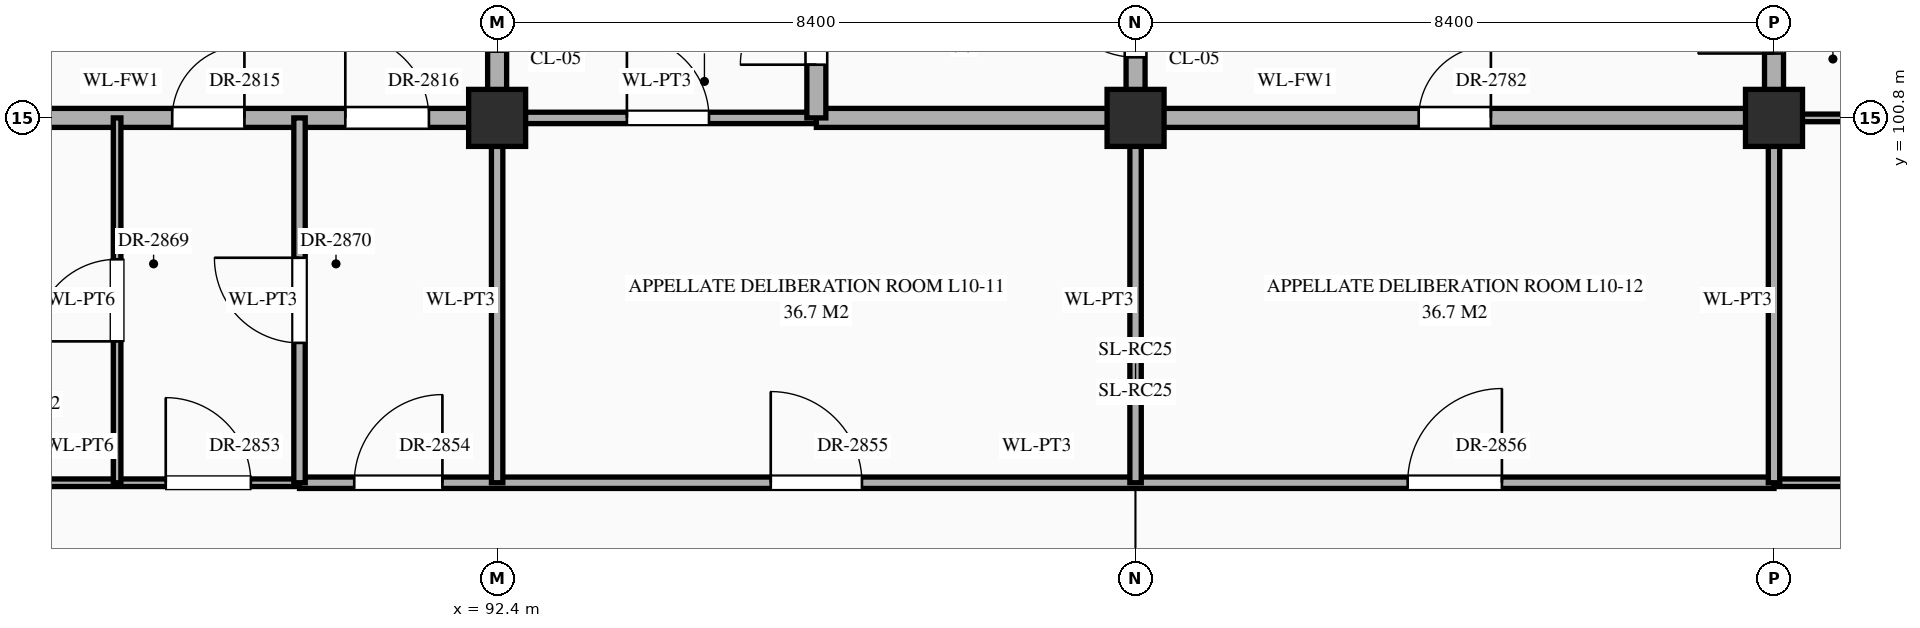
"""IFC4 building model, lengths in metres.
Left out: names, types, materials, properties, quantities, classifications, styles, units other than length and angle.
Written with IfcOpenShell. Run it as: python <this file> out.ifc"""

import sys

from ifc_helpers import new_model, si_unit, direction, frame, frame_2d, origin, origin_2d, place, context, subcontext, project, spatial, rectangle, extrude, element, fill, save


model = new_model("IFC4")
c1 = context("Model", 3, precision=1e-05, world=origin(), true_north=direction((0.0, 1.0)))
c2 = subcontext(c1, "Body", "Model", "MODEL_VIEW")
j1 = project(units=[si_unit("LENGTHUNIT", "METRE"), si_unit("PLANEANGLEUNIT", "RADIAN")], contexts=[c1])
p1 = place(None, origin())
s1 = spatial("IfcSite", under=j1, at=p1, CompositionType="ELEMENT")
p2 = place(p1, origin())
s2 = spatial("IfcBuilding", under=s1, at=p2, CompositionType="ELEMENT")
p3 = place(p2, frame((0.0, 0.0, 43.5)))
s3 = spatial("IfcBuildingStorey", under=s2, at=p3, CompositionType="ELEMENT", Elevation=43.5)
for number, where, z_axis, x_axis in (
    (1, (92.4, 100.8, 0.0), (0.0, 0.0, 1.0), (1.0, 0.0, 0.0)),
    (2, (100.8, 100.8, 0.0), (0.0, 0.0, 1.0), (1.0, 0.0, 0.0)),
    (3, (109.2, 100.8, 0.0), (0.0, 0.0, 1.0), (1.0, 0.0, 0.0)),
):
    element("IfcColumn", number, at=place(p3, frame(where, z_axis=z_axis, x_axis=x_axis)), inside=s3, PredefinedType="COLUMN", context=c2, shape_type="SweptSolid", body=[
        extrude(rectangle(XDim=0.75, YDim=0.75, at=origin_2d()), origin(), (0.0, 0.0, 1.0), 4.2),
    ])
p4 = place(p3, frame((84.0, 96.0, 0.0), z_axis=(0.0, 0.0, 1.0), x_axis=(1.0, 0.0, 0.0)))
e4 = element("IfcWall", 4, at=p4, inside=s3, PredefinedType="STANDARD", context=c2, shape_type="SweptSolid", body=[
    extrude(rectangle(XDim=5.8, YDim=0.1, at=frame_2d((2.9, 0.0))), origin(), (0.0, 0.0, 1.0), 3.95),
])
p5 = place(p4, frame((1.16, 0.0, 0.0)))
e5 = element("IfcOpeningElement", 5, at=p5, cuts=e4, PredefinedType="OPENING", context=c2, shape_type="SweptSolid", body=[
    extrude(rectangle(XDim=1.08, YDim=2.25, at=frame_2d((0.54, 1.125))), frame((0.0, 0.062, 0.0), z_axis=(0.0, -1.0, 0.0), x_axis=(1.0, 0.0, 0.0)), (0.0, 0.0, 1.0), 0.124),
])
p6 = place(p4, frame((4.04, 0.0, 0.0)))
e6 = element("IfcOpeningElement", 6, at=p6, cuts=e4, PredefinedType="OPENING", context=c2, shape_type="SweptSolid", body=[
    extrude(rectangle(XDim=1.12, YDim=2.25, at=frame_2d((0.56, 1.125))), frame((0.0, 0.062, 0.0), z_axis=(0.0, -1.0, 0.0), x_axis=(1.0, 0.0, 0.0)), (0.0, 0.0, 1.0), 0.124),
])
p7 = place(p3, frame((89.8, 96.0, 0.0), z_axis=(0.0, 0.0, 1.0), x_axis=(1.0, 0.0, 0.0)))
e7 = element("IfcWall", 7, at=p7, inside=s3, PredefinedType="STANDARD", context=c2, shape_type="SweptSolid", body=[
    extrude(rectangle(XDim=19.4, YDim=0.15, at=frame_2d((9.7, 0.0))), origin(), (0.0, 0.0, 1.0), 3.95),
])
p8 = place(p7, frame((0.72, 0.0, 0.0)))
e8 = element("IfcOpeningElement", 8, at=p8, cuts=e7, PredefinedType="OPENING", context=c2, shape_type="SweptSolid", body=[
    extrude(rectangle(XDim=1.16, YDim=2.3, at=frame_2d((0.58, 1.15))), frame((0.0, 0.087, 0.0), z_axis=(0.0, -1.0, 0.0), x_axis=(1.0, 0.0, 0.0)), (0.0, 0.0, 1.0), 0.174),
])
p9 = place(p7, frame((6.2, 0.0, 0.0)))
e9 = element("IfcOpeningElement", 9, at=p9, cuts=e7, PredefinedType="OPENING", context=c2, shape_type="SweptSolid", body=[
    extrude(rectangle(XDim=1.2, YDim=2.35, at=frame_2d((0.6, 1.175))), frame((0.0, 0.087, 0.0), z_axis=(0.0, -1.0, 0.0), x_axis=(1.0, 0.0, 0.0)), (0.0, 0.0, 1.0), 0.174),
])
p10 = place(p7, frame((14.58, 0.0, 0.0)))
e10 = element("IfcOpeningElement", 10, at=p10, cuts=e7, PredefinedType="OPENING", context=c2, shape_type="SweptSolid", body=[
    extrude(rectangle(XDim=1.24, YDim=2.3, at=frame_2d((0.62, 1.15))), frame((0.0, 0.087, 0.0), z_axis=(0.0, -1.0, 0.0), x_axis=(1.0, 0.0, 0.0)), (0.0, 0.0, 1.0), 0.174),
])
p11 = place(p3, frame((109.2, 96.0, 0.0), z_axis=(0.0, 0.0, 1.0), x_axis=(1.0, 0.0, 0.0)))
e11 = element("IfcWall", 11, at=p11, inside=s3, PredefinedType="STANDARD", context=c2, shape_type="SweptSolid", body=[
    extrude(rectangle(XDim=5.8, YDim=0.1, at=frame_2d((2.9, 0.0))), origin(), (0.0, 0.0, 1.0), 3.95),
])
p12 = place(p11, frame((1.06, 0.0, 0.0)))
e12 = element("IfcOpeningElement", 12, at=p12, cuts=e11, PredefinedType="OPENING", context=c2, shape_type="SweptSolid", body=[
    extrude(rectangle(XDim=1.28, YDim=2.35, at=frame_2d((0.64, 1.175))), frame((0.0, 0.062, 0.0), z_axis=(0.0, -1.0, 0.0), x_axis=(1.0, 0.0, 0.0)), (0.0, 0.0, 1.0), 0.124),
])
p13 = place(p11, frame((4.13, 0.0, 0.0)))
e13 = element("IfcOpeningElement", 13, at=p13, cuts=e11, PredefinedType="OPENING", context=c2, shape_type="SweptSolid", body=[
    extrude(rectangle(XDim=0.94, YDim=2.3, at=frame_2d((0.47, 1.15))), frame((0.0, 0.062, 0.0), z_axis=(0.0, -1.0, 0.0), x_axis=(1.0, 0.0, 0.0)), (0.0, 0.0, 1.0), 0.124),
])
p14 = place(p3, frame((75.6, 100.8, 0.0), z_axis=(0.0, 0.0, 1.0), x_axis=(1.0, 0.0, 0.0)))
e14 = element("IfcWall", 14, at=p14, inside=s3, PredefinedType="STANDARD", context=c2, shape_type="SweptSolid", body=[
    extrude(rectangle(XDim=16.8, YDim=0.25, at=frame_2d((8.4, 0.0))), origin(), (0.0, 0.0, 1.0), 3.1),
])
p15 = place(p14, frame((3.725, 0.0, 0.0)))
e15 = element("IfcOpeningElement", 15, at=p15, cuts=e14, PredefinedType="OPENING", context=c2, shape_type="SweptSolid", body=[
    extrude(rectangle(XDim=0.95, YDim=2.15, at=frame_2d((0.475, 1.075))), frame((0.0, 0.137, 0.0), z_axis=(0.0, -1.0, 0.0), x_axis=(1.0, 0.0, 0.0)), (0.0, 0.0, 1.0), 0.274),
])
p16 = place(p14, frame((9.748, 0.0, 0.0)))
e16 = element("IfcOpeningElement", 16, at=p16, cuts=e14, PredefinedType="OPENING", context=c2, shape_type="SweptSolid", body=[
    extrude(rectangle(XDim=1.0, YDim=2.2, at=frame_2d((0.5, 1.1))), frame((0.0, 0.137, 0.0), z_axis=(0.0, -1.0, 0.0), x_axis=(1.0, 0.0, 0.0)), (0.0, 0.0, 1.0), 0.274),
])
p17 = place(p14, frame((12.525, 0.0, 0.0)))
e17 = element("IfcOpeningElement", 17, at=p17, cuts=e14, PredefinedType="OPENING", context=c2, shape_type="SweptSolid", body=[
    extrude(rectangle(XDim=0.95, YDim=2.15, at=frame_2d((0.475, 1.075))), frame((0.0, 0.137, 0.0), z_axis=(0.0, -1.0, 0.0), x_axis=(1.0, 0.0, 0.0)), (0.0, 0.0, 1.0), 0.274),
])
p18 = place(p14, frame((14.802, 0.0, 0.0)))
e18 = element("IfcOpeningElement", 18, at=p18, cuts=e14, PredefinedType="OPENING", context=c2, shape_type="SweptSolid", body=[
    extrude(rectangle(XDim=1.1, YDim=2.2, at=frame_2d((0.55, 1.1))), frame((0.0, 0.137, 0.0), z_axis=(0.0, -1.0, 0.0), x_axis=(1.0, 0.0, 0.0)), (0.0, 0.0, 1.0), 0.274),
])
p19 = place(p3, frame((92.4, 100.8, 0.0), z_axis=(0.0, 0.0, 1.0), x_axis=(1.0, 0.0, 0.0)))
e19 = element("IfcWall", 19, at=p19, inside=s3, PredefinedType="STANDARD", context=c2, shape_type="SweptSolid", body=[
    extrude(rectangle(XDim=4.2, YDim=0.15, at=frame_2d((2.1, 0.0))), origin(), (0.0, 0.0, 1.0), 3.1),
])
p20 = place(p19, frame((1.708, 0.0, 0.0)))
e20 = element("IfcOpeningElement", 20, at=p20, cuts=e19, PredefinedType="OPENING", context=c2, shape_type="SweptSolid", body=[
    extrude(rectangle(XDim=1.08, YDim=2.25, at=frame_2d((0.54, 1.125))), frame((0.0, 0.087, 0.0), z_axis=(0.0, -1.0, 0.0), x_axis=(1.0, 0.0, 0.0)), (0.0, 0.0, 1.0), 0.174),
])
p21 = place(p3, frame((96.6, 100.8, 0.0), z_axis=(0.0, 0.0, 1.0), x_axis=(1.0, 0.0, 0.0)))
e21 = element("IfcWall", 21, at=p21, inside=s3, PredefinedType="STANDARD", context=c2, shape_type="SweptSolid", body=[
    extrude(rectangle(XDim=12.6, YDim=0.25, at=frame_2d((6.3, 0.0))), origin(), (0.0, 0.0, 1.0), 3.1),
])
p22 = place(p21, frame((7.925, 0.0, 0.0)))
e22 = element("IfcOpeningElement", 22, at=p22, cuts=e21, PredefinedType="OPENING", context=c2, shape_type="SweptSolid", body=[
    extrude(rectangle(XDim=0.95, YDim=2.15, at=frame_2d((0.475, 1.075))), frame((0.0, 0.137, 0.0), z_axis=(0.0, -1.0, 0.0), x_axis=(1.0, 0.0, 0.0)), (0.0, 0.0, 1.0), 0.274),
])
p23 = place(p3, frame((109.2, 100.8, 0.0), z_axis=(0.0, 0.0, 1.0), x_axis=(1.0, 0.0, 0.0)))
e23 = element("IfcWall", 23, at=p23, inside=s3, PredefinedType="STANDARD", context=c2, shape_type="SweptSolid", body=[
    extrude(rectangle(XDim=3.4, YDim=0.1, at=frame_2d((1.7, 0.0))), origin(), (0.0, 0.0, 1.0), 3.1),
])
p24 = place(p23, frame((1.417, 0.0, 0.0)))
e24 = element("IfcOpeningElement", 24, at=p24, cuts=e23, PredefinedType="OPENING", context=c2, shape_type="SweptSolid", body=[
    extrude(rectangle(XDim=0.86, YDim=2.1, at=frame_2d((0.43, 1.05))), frame((0.0, 0.062, 0.0), z_axis=(0.0, -1.0, 0.0), x_axis=(1.0, 0.0, 0.0)), (0.0, 0.0, 1.0), 0.124),
])
p25 = place(p3, frame((87.4, 96.0, 0.0), z_axis=(0.0, 0.0, 1.0), x_axis=(0.0, 1.0, 0.0)))
e25 = element("IfcWall", 25, at=p25, inside=s3, PredefinedType="STANDARD", context=c2, shape_type="SweptSolid", body=[
    extrude(rectangle(XDim=4.8, YDim=0.1, at=frame_2d((2.4, 0.0))), origin(), (0.0, 0.0, 1.0), 3.95),
])
p26 = place(p25, frame((1.86, 0.0, 0.0)))
e26 = element("IfcOpeningElement", 26, at=p26, cuts=e25, PredefinedType="OPENING", context=c2, shape_type="SweptSolid", body=[
    extrude(rectangle(XDim=1.08, YDim=2.25, at=frame_2d((0.54, 1.125))), frame((0.0, 0.062, 0.0), z_axis=(0.0, -1.0, 0.0), x_axis=(1.0, 0.0, 0.0)), (0.0, 0.0, 1.0), 0.124),
])
p27 = place(p3, frame((89.8, 96.0, 0.0), z_axis=(0.0, 0.0, 1.0), x_axis=(0.0, 1.0, 0.0)))
e27 = element("IfcWall", 27, at=p27, inside=s3, PredefinedType="STANDARD", context=c2, shape_type="SweptSolid", body=[
    extrude(rectangle(XDim=4.8, YDim=0.15, at=frame_2d((2.4, 0.0))), origin(), (0.0, 0.0, 1.0), 3.95),
])
p28 = place(p27, frame((1.84, 0.0, 0.0)))
e28 = element("IfcOpeningElement", 28, at=p28, cuts=e27, PredefinedType="OPENING", context=c2, shape_type="SweptSolid", body=[
    extrude(rectangle(XDim=1.12, YDim=2.25, at=frame_2d((0.56, 1.125))), frame((0.0, 0.087, 0.0), z_axis=(0.0, -1.0, 0.0), x_axis=(1.0, 0.0, 0.0)), (0.0, 0.0, 1.0), 0.174),
])
p29 = place(p3, frame((92.4, 96.0, 0.0), z_axis=(0.0, 0.0, 1.0), x_axis=(0.0, 1.0, 0.0)))
e29 = element("IfcWall", 29, at=p29, inside=s3, PredefinedType="STANDARD", context=c2, shape_type="SweptSolid", body=[
    extrude(rectangle(XDim=4.8, YDim=0.15, at=frame_2d((2.4, 0.0))), origin(), (0.0, 0.0, 1.0), 3.2),
])
p30 = place(p3, frame((92.4, 100.8, 0.0), z_axis=(0.0, 0.0, 1.0), x_axis=(0.0, 1.0, 0.0)))
e30 = element("IfcWall", 30, at=p30, inside=s3, PredefinedType="STANDARD", context=c2, shape_type="SweptSolid", body=[
    extrude(rectangle(XDim=3.6, YDim=0.25, at=frame_2d((1.8, 0.0))), origin(), (0.0, 0.0, 1.0), 3.2),
])
p31 = place(p30, frame((0.873, 0.0, 0.0)))
e31 = element("IfcOpeningElement", 31, at=p31, cuts=e30, PredefinedType="OPENING", context=c2, shape_type="SweptSolid", body=[
    extrude(rectangle(XDim=0.95, YDim=2.15, at=frame_2d((0.475, 1.075))), frame((0.0, 0.137, 0.0), z_axis=(0.0, -1.0, 0.0), x_axis=(1.0, 0.0, 0.0)), (0.0, 0.0, 1.0), 0.274),
])
p32 = place(p3, frame((96.6, 100.8, 0.0), z_axis=(0.0, 0.0, 1.0), x_axis=(0.0, 1.0, 0.0)))
e32 = element("IfcWall", 32, at=p32, inside=s3, PredefinedType="STANDARD", context=c2, shape_type="SweptSolid", body=[
    extrude(rectangle(XDim=3.6, YDim=0.25, at=frame_2d((1.8, 0.0))), origin(), (0.0, 0.0, 1.0), 3.95),
])
p33 = place(p32, frame((0.7, 0.0, 0.0)))
e33 = element("IfcOpeningElement", 33, at=p33, cuts=e32, PredefinedType="OPENING", context=c2, shape_type="SweptSolid", body=[
    extrude(rectangle(XDim=1.0, YDim=2.2, at=frame_2d((0.5, 1.1))), frame((0.0, 0.137, 0.0), z_axis=(0.0, -1.0, 0.0), x_axis=(1.0, 0.0, 0.0)), (0.0, 0.0, 1.0), 0.274),
])
p34 = place(p3, frame((100.8, 96.0, 0.0), z_axis=(0.0, 0.0, 1.0), x_axis=(0.0, 1.0, 0.0)))
e34 = element("IfcWall", 34, at=p34, inside=s3, PredefinedType="STANDARD", context=c2, shape_type="SweptSolid", body=[
    extrude(rectangle(XDim=4.8, YDim=0.15, at=frame_2d((2.4, 0.0))), origin(), (0.0, 0.0, 1.0), 3.2),
])
p35 = place(p3, frame((100.8, 100.8, 0.0), z_axis=(0.0, 0.0, 1.0), x_axis=(0.0, 1.0, 0.0)))
e35 = element("IfcWall", 35, at=p35, inside=s3, PredefinedType="STANDARD", context=c2, shape_type="SweptSolid", body=[
    extrude(rectangle(XDim=2.4, YDim=0.25, at=frame_2d((1.2, 0.0))), origin(), (0.0, 0.0, 1.0), 3.2),
])
p36 = place(p35, frame((0.798, 0.0, 0.0)))
e36 = element("IfcOpeningElement", 36, at=p36, cuts=e35, PredefinedType="OPENING", context=c2, shape_type="SweptSolid", body=[
    extrude(rectangle(XDim=1.1, YDim=2.2, at=frame_2d((0.55, 1.1))), frame((0.0, 0.137, 0.0), z_axis=(0.0, -1.0, 0.0), x_axis=(1.0, 0.0, 0.0)), (0.0, 0.0, 1.0), 0.274),
])
p37 = place(p3, frame((109.2, 96.0, 0.0), z_axis=(0.0, 0.0, 1.0), x_axis=(0.0, 1.0, 0.0)))
e37 = element("IfcWall", 37, at=p37, inside=s3, PredefinedType="STANDARD", context=c2, shape_type="SweptSolid", body=[
    extrude(rectangle(XDim=4.8, YDim=0.15, at=frame_2d((2.4, 0.0))), origin(), (0.0, 0.0, 1.0), 3.2),
])
p38 = place(p3, frame((109.2, 100.8, 0.0), z_axis=(0.0, 0.0, 1.0), x_axis=(0.0, 1.0, 0.0)))
e38 = element("IfcWall", 38, at=p38, inside=s3, PredefinedType="STANDARD", context=c2, shape_type="SweptSolid", body=[
    extrude(rectangle(XDim=2.4, YDim=0.25, at=frame_2d((1.2, 0.0))), origin(), (0.0, 0.0, 1.0), 3.2),
])
p39 = place(p38, frame((0.847, 0.0, 0.0)))
e39 = element("IfcOpeningElement", 39, at=p39, cuts=e38, PredefinedType="OPENING", context=c2, shape_type="SweptSolid", body=[
    extrude(rectangle(XDim=1.0, YDim=2.2, at=frame_2d((0.5, 1.1))), frame((0.0, 0.137, 0.0), z_axis=(0.0, -1.0, 0.0), x_axis=(1.0, 0.0, 0.0)), (0.0, 0.0, 1.0), 0.274),
])
p40 = place(p36, origin())
e40 = element("IfcDoor", 40, at=p40, inside=s3, OperationType="SINGLE_SWING_RIGHT", PredefinedType="DOOR", context=c2, shape_type="SweptSolid", body=[
    extrude(rectangle(XDim=1.1, YDim=2.2, at=frame_2d((0.55, 1.1))), frame((0.0, 0.025, 0.0), z_axis=(0.0, -1.0, 0.0), x_axis=(1.0, 0.0, 0.0)), (0.0, 0.0, 1.0), 0.05),
])
fill(e36, e40)
p41 = place(p39, origin())
e41 = element("IfcDoor", 41, at=p41, inside=s3, OperationType="SINGLE_SWING_LEFT", PredefinedType="DOOR", context=c2, shape_type="SweptSolid", body=[
    extrude(rectangle(XDim=1.0, YDim=2.2, at=frame_2d((0.5, 1.1))), frame((0.0, 0.025, 0.0), z_axis=(0.0, -1.0, 0.0), x_axis=(1.0, 0.0, 0.0)), (0.0, 0.0, 1.0), 0.05),
])
fill(e39, e41)
p42 = place(p22, origin())
e42 = element("IfcDoor", 42, at=p42, inside=s3, OperationType="SINGLE_SWING_RIGHT", PredefinedType="DOOR", context=c2, shape_type="SweptSolid", body=[
    extrude(rectangle(XDim=0.95, YDim=2.15, at=frame_2d((0.475, 1.075))), frame((0.0, 0.025, 0.0), z_axis=(0.0, -1.0, 0.0), x_axis=(1.0, 0.0, 0.0)), (0.0, 0.0, 1.0), 0.05),
])
fill(e22, e42)
p43 = place(p33, origin())
e43 = element("IfcDoor", 43, at=p43, inside=s3, OperationType="SINGLE_SWING_LEFT", PredefinedType="DOOR", context=c2, shape_type="SweptSolid", body=[
    extrude(rectangle(XDim=1.0, YDim=2.2, at=frame_2d((0.5, 1.1))), frame((0.0, 0.025, 0.0), z_axis=(0.0, -1.0, 0.0), x_axis=(1.0, 0.0, 0.0)), (0.0, 0.0, 1.0), 0.05),
])
fill(e33, e43)
p44 = place(p20, origin())
e44 = element("IfcDoor", 44, at=p44, inside=s3, OperationType="SINGLE_SWING_LEFT", PredefinedType="DOOR", context=c2, shape_type="SweptSolid", body=[
    extrude(rectangle(XDim=1.08, YDim=2.25, at=frame_2d((0.54, 1.125))), frame((0.0, 0.025, 0.0), z_axis=(0.0, -1.0, 0.0), x_axis=(1.0, 0.0, 0.0)), (0.0, 0.0, 1.0), 0.05),
])
fill(e20, e44)
p45 = place(p17, origin())
e45 = element("IfcDoor", 45, at=p45, inside=s3, OperationType="SINGLE_SWING_RIGHT", PredefinedType="DOOR", context=c2, shape_type="SweptSolid", body=[
    extrude(rectangle(XDim=0.95, YDim=2.15, at=frame_2d((0.475, 1.075))), frame((0.0, 0.025, 0.0), z_axis=(0.0, -1.0, 0.0), x_axis=(1.0, 0.0, 0.0)), (0.0, 0.0, 1.0), 0.05),
])
fill(e17, e45)
p46 = place(p18, origin())
e46 = element("IfcDoor", 46, at=p46, inside=s3, OperationType="SINGLE_SWING_LEFT", PredefinedType="DOOR", context=c2, shape_type="SweptSolid", body=[
    extrude(rectangle(XDim=1.1, YDim=2.2, at=frame_2d((0.55, 1.1))), frame((0.0, 0.025, 0.0), z_axis=(0.0, -1.0, 0.0), x_axis=(1.0, 0.0, 0.0)), (0.0, 0.0, 1.0), 0.05),
])
fill(e18, e46)
p47 = place(p6, origin())
e47 = element("IfcDoor", 47, at=p47, inside=s3, OperationType="SINGLE_SWING_LEFT", PredefinedType="DOOR", context=c2, shape_type="SweptSolid", body=[
    extrude(rectangle(XDim=1.12, YDim=2.25, at=frame_2d((0.56, 1.125))), frame((0.0, 0.025, 0.0), z_axis=(0.0, -1.0, 0.0), x_axis=(1.0, 0.0, 0.0)), (0.0, 0.0, 1.0), 0.05),
])
fill(e6, e47)
p48 = place(p8, origin())
e48 = element("IfcDoor", 48, at=p48, inside=s3, OperationType="SINGLE_SWING_RIGHT", PredefinedType="DOOR", context=c2, shape_type="SweptSolid", body=[
    extrude(rectangle(XDim=1.16, YDim=2.3, at=frame_2d((0.58, 1.15))), frame((0.0, 0.025, 0.0), z_axis=(0.0, -1.0, 0.0), x_axis=(1.0, 0.0, 0.0)), (0.0, 0.0, 1.0), 0.05),
])
fill(e8, e48)
p49 = place(p9, origin())
e49 = element("IfcDoor", 49, at=p49, inside=s3, OperationType="SINGLE_SWING_LEFT", PredefinedType="DOOR", context=c2, shape_type="SweptSolid", body=[
    extrude(rectangle(XDim=1.2, YDim=2.35, at=frame_2d((0.6, 1.175))), frame((0.0, 0.025, 0.0), z_axis=(0.0, -1.0, 0.0), x_axis=(1.0, 0.0, 0.0)), (0.0, 0.0, 1.0), 0.05),
])
fill(e9, e49)
p50 = place(p10, origin())
e50 = element("IfcDoor", 50, at=p50, inside=s3, OperationType="SINGLE_SWING_RIGHT", PredefinedType="DOOR", context=c2, shape_type="SweptSolid", body=[
    extrude(rectangle(XDim=1.24, YDim=2.3, at=frame_2d((0.62, 1.15))), frame((0.0, 0.025, 0.0), z_axis=(0.0, -1.0, 0.0), x_axis=(1.0, 0.0, 0.0)), (0.0, 0.0, 1.0), 0.05),
])
fill(e10, e50)
p51 = place(p26, origin())
e51 = element("IfcDoor", 51, at=p51, inside=s3, OperationType="SINGLE_SWING_LEFT", PredefinedType="DOOR", context=c2, shape_type="SweptSolid", body=[
    extrude(rectangle(XDim=1.08, YDim=2.25, at=frame_2d((0.54, 1.125))), frame((0.0, 0.025, 0.0), z_axis=(0.0, -1.0, 0.0), x_axis=(1.0, 0.0, 0.0)), (0.0, 0.0, 1.0), 0.05),
])
fill(e26, e51)
p52 = place(p28, origin())
e52 = element("IfcDoor", 52, at=p52, inside=s3, OperationType="SINGLE_SWING_RIGHT", PredefinedType="DOOR", context=c2, shape_type="SweptSolid", body=[
    extrude(rectangle(XDim=1.12, YDim=2.25, at=frame_2d((0.56, 1.125))), frame((0.0, 0.025, 0.0), z_axis=(0.0, -1.0, 0.0), x_axis=(1.0, 0.0, 0.0)), (0.0, 0.0, 1.0), 0.05),
])
fill(e28, e52)
save(model, sys.argv[1])
